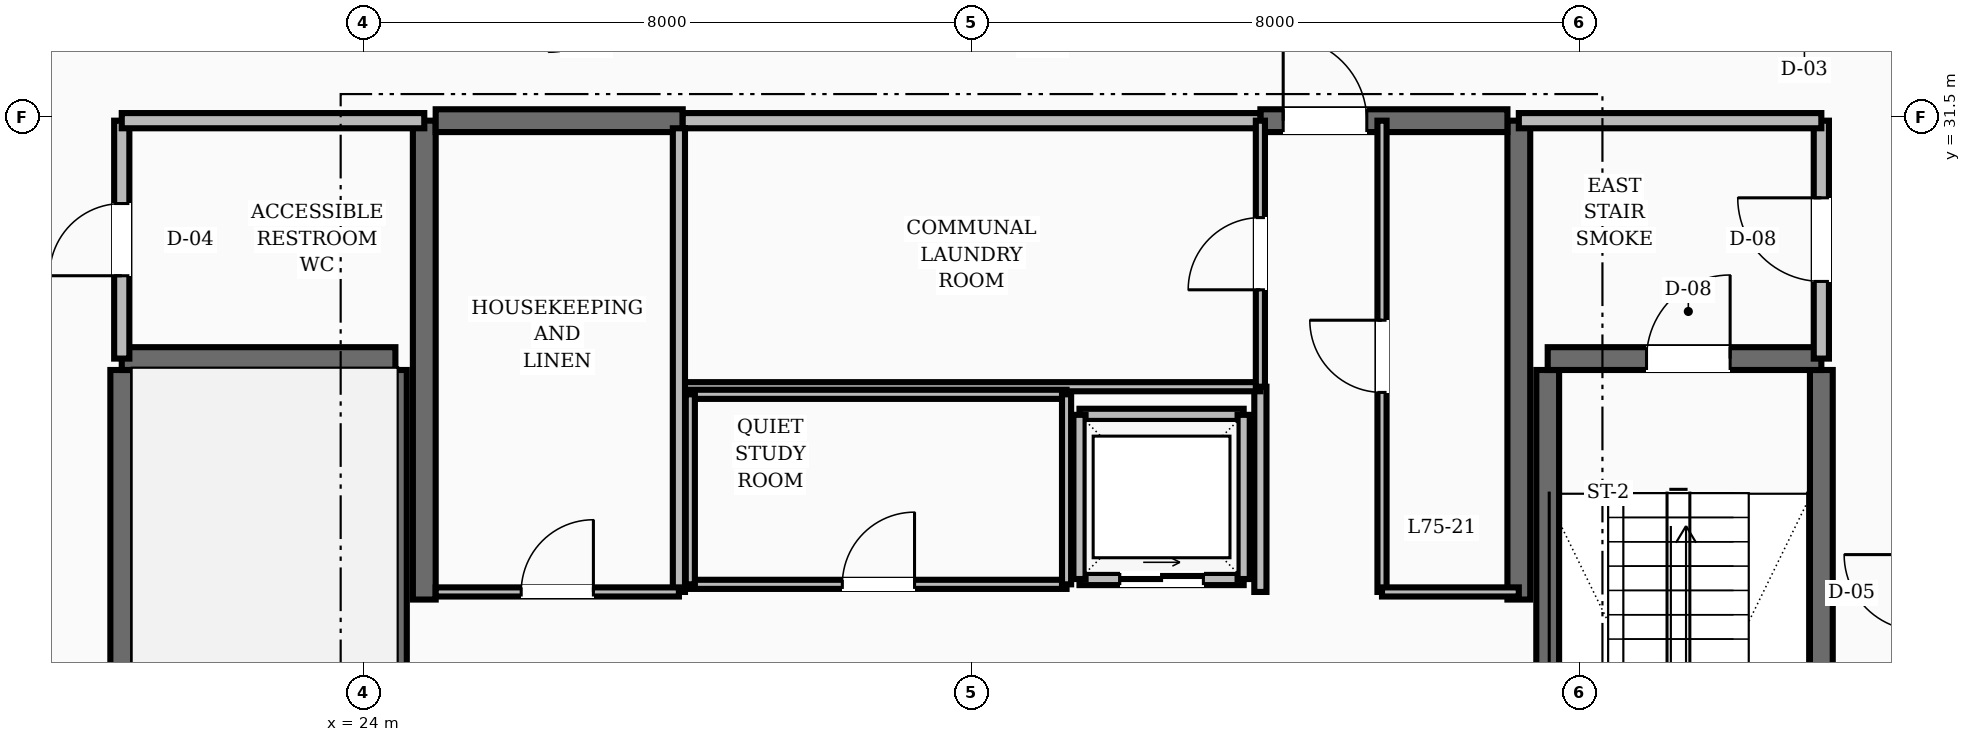
"""IFC4 building model, lengths in metres.
Left out: names, types, materials, properties, quantities, classifications, styles, units other than length and angle.
Written with IfcOpenShell. Run it as: python <this file> out.ifc"""

import sys

from ifc_helpers import new_model, si_unit, direction, frame, frame_2d, origin, place, context, subcontext, project, spatial, rectangle, extrude, element, fill, save


model = new_model("IFC4")
c1 = context("Model", 3, precision=1e-05, world=origin(), true_north=direction((0.0, 1.0)))
c2 = subcontext(c1, "Body", "Model", "MODEL_VIEW")
j1 = project(units=[si_unit("LENGTHUNIT", "METRE"), si_unit("PLANEANGLEUNIT", "RADIAN")], contexts=[c1])
p1 = place(None, origin())
s1 = spatial("IfcSite", under=j1, at=p1, CompositionType="ELEMENT")
p2 = place(p1, origin())
s2 = spatial("IfcBuilding", under=s1, at=p2, CompositionType="ELEMENT")
p3 = place(p2, frame((0.0, 0.0, 286.8)))
s3 = spatial("IfcBuildingStorey", under=s2, at=p3, CompositionType="ELEMENT", Elevation=286.8)
for number, where, z_axis, x_axis in (
    (1, (24.8, 25.15, 0.0), (0.0, 0.0, 1.0), (0.0, 1.0, 0.0)),
    (2, (39.2, 25.15, 0.0), (0.0, 0.0, 1.0), (0.0, 1.0, 0.0)),
):
    element("IfcWall", number, at=place(p3, frame(where, z_axis=z_axis, x_axis=x_axis)), inside=s3, PredefinedType="SHEAR", context=c2, shape_type="SweptSolid", body=[
        extrude(rectangle(XDim=6.3, YDim=0.3, at=frame_2d((3.15, 0.0))), origin(), (0.0, 0.0, 1.0), 3.6),
    ])
p4 = place(p3, frame((24.95, 31.45, 0.0), z_axis=(0.0, 0.0, 1.0), x_axis=(1.0, 0.0, 0.0)))
e3 = element("IfcWall", 3, at=p4, inside=s3, PredefinedType="SHEAR", context=c2, shape_type="SweptSolid", body=[
    extrude(rectangle(XDim=3.25, YDim=0.3, at=frame_2d((1.625, 0.0))), origin(), (0.0, 0.0, 1.0), 3.6),
])
p5 = place(p3, frame((35.8, 31.45, 0.0), z_axis=(0.0, 0.0, 1.0), x_axis=(1.0, 0.0, 0.0)))
e4 = element("IfcWall", 4, at=p5, inside=s3, PredefinedType="SHEAR", context=c2, shape_type="SweptSolid", body=[
    extrude(rectangle(XDim=3.25, YDim=0.3, at=frame_2d((1.625, 0.0))), origin(), (0.0, 0.0, 1.0), 3.6),
])
p6 = place(p5, frame((0.3, 0.0, 0.0)))
e5 = element("IfcOpeningElement", 5, at=p6, cuts=e4, PredefinedType="OPENING", context=c2, shape_type="SweptSolid", body=[
    extrude(rectangle(XDim=1.1, YDim=2.1, at=frame_2d((0.55, 1.05))), frame((0.0, 0.16, 0.0), z_axis=(0.0, -1.0, 0.0), x_axis=(1.0, 0.0, 0.0)), (0.0, 0.0, 1.0), 0.32),
])
for number, where, z_axis, x_axis in (
    (6, (20.82, 19.43, 0.0), (0.0, 0.0, 1.0), (0.0, 1.0, 0.0)),
    (7, (24.42, 19.43, 0.0), (0.0, 0.0, 1.0), (0.0, 1.0, 0.0)),
):
    element("IfcWall", number, at=place(p3, frame(where, z_axis=z_axis, x_axis=x_axis)), inside=s3, PredefinedType="SHEAR", context=c2, shape_type="SweptSolid", body=[
        extrude(rectangle(XDim=8.74, YDim=0.3, at=frame_2d((4.37, 0.0))), origin(), (0.0, 0.0, 1.0), 3.6),
    ])
p7 = place(p3, frame((20.82, 28.32, 0.0), z_axis=(0.0, 0.0, 1.0), x_axis=(1.0, 0.0, 0.0)))
e8 = element("IfcWall", 8, at=p7, inside=s3, PredefinedType="SHEAR", context=c2, shape_type="SweptSolid", body=[
    extrude(rectangle(XDim=3.6, YDim=0.3, at=frame_2d((1.8, 0.0))), origin(), (0.0, 0.0, 1.0), 3.6),
])
for number, where, z_axis, x_axis in (
    (9, (43.18, 19.43, 0.0), (0.0, 0.0, 1.0), (0.0, 1.0, 0.0)),
    (10, (39.58, 19.43, 0.0), (0.0, 0.0, 1.0), (0.0, 1.0, 0.0)),
):
    element("IfcWall", number, at=place(p3, frame(where, z_axis=z_axis, x_axis=x_axis)), inside=s3, PredefinedType="SHEAR", context=c2, shape_type="SweptSolid", body=[
        extrude(rectangle(XDim=8.74, YDim=0.3, at=frame_2d((4.37, 0.0))), origin(), (0.0, 0.0, 1.0), 3.6),
    ])
p8 = place(p3, frame((39.58, 28.32, 0.0), z_axis=(0.0, 0.0, 1.0), x_axis=(1.0, 0.0, 0.0)))
e11 = element("IfcWall", 11, at=p8, inside=s3, PredefinedType="SHEAR", context=c2, shape_type="SweptSolid", body=[
    extrude(rectangle(XDim=3.6, YDim=0.3, at=frame_2d((1.8, 0.0))), origin(), (0.0, 0.0, 1.0), 3.6),
])
p9 = place(p8, frame((1.3, 0.0, 0.0)))
e12 = element("IfcOpeningElement", 12, at=p9, cuts=e11, PredefinedType="OPENING", context=c2, shape_type="SweptSolid", body=[
    extrude(rectangle(XDim=1.1, YDim=2.1, at=frame_2d((0.55, 1.05))), frame((0.0, 0.16, 0.0), z_axis=(0.0, -1.0, 0.0), x_axis=(1.0, 0.0, 0.0)), (0.0, 0.0, 1.0), 0.32),
])
p10 = place(p3, frame((43.18, 28.32, 0.0), z_axis=(0.0, 0.0, 1.0), x_axis=(0.0, 1.0, 0.0)))
e13 = element("IfcWall", 13, at=p10, inside=s3, PredefinedType="SOLIDWALL", context=c2, shape_type="SweptSolid", body=[
    extrude(rectangle(XDim=3.13, YDim=0.2, at=frame_2d((1.565, 0.0))), origin(), (0.0, 0.0, 1.0), 2.87),
])
p11 = place(p10, frame((1.015, 0.0, 0.0)))
e14 = element("IfcOpeningElement", 14, at=p11, cuts=e13, PredefinedType="OPENING", context=c2, shape_type="SweptSolid", body=[
    extrude(rectangle(XDim=1.1, YDim=2.1, at=frame_2d((0.55, 1.05))), frame((0.0, 0.11, 0.0), z_axis=(0.0, -1.0, 0.0), x_axis=(1.0, 0.0, 0.0)), (0.0, 0.0, 1.0), 0.22),
])
p12 = place(p3, frame((39.2, 31.45, 0.0), z_axis=(0.0, 0.0, 1.0), x_axis=(1.0, 0.0, 0.0)))
e15 = element("IfcWall", 15, at=p12, inside=s3, PredefinedType="SOLIDWALL", context=c2, shape_type="SweptSolid", body=[
    extrude(rectangle(XDim=3.98, YDim=0.2, at=frame_2d((1.99, 0.0))), origin(), (0.0, 0.0, 1.0), 2.87),
])
p13 = place(p3, frame((20.82, 28.32, 0.0), z_axis=(0.0, 0.0, 1.0), x_axis=(0.0, 1.0, 0.0)))
e16 = element("IfcWall", 16, at=p13, inside=s3, PredefinedType="SOLIDWALL", context=c2, shape_type="SweptSolid", body=[
    extrude(rectangle(XDim=3.13, YDim=0.2, at=frame_2d((1.565, 0.0))), origin(), (0.0, 0.0, 1.0), 2.87),
])
p14 = place(p13, frame((1.09, 0.0, 0.0)))
e17 = element("IfcOpeningElement", 17, at=p14, cuts=e16, PredefinedType="OPENING", context=c2, shape_type="SweptSolid", body=[
    extrude(rectangle(XDim=0.95, YDim=2.1, at=frame_2d((0.475, 1.05))), frame((0.0, 0.11, 0.0), z_axis=(0.0, -1.0, 0.0), x_axis=(1.0, 0.0, 0.0)), (0.0, 0.0, 1.0), 0.22),
])
p15 = place(p3, frame((20.82, 31.45, 0.0), z_axis=(0.0, 0.0, 1.0), x_axis=(1.0, 0.0, 0.0)))
e18 = element("IfcWall", 18, at=p15, inside=s3, PredefinedType="SOLIDWALL", context=c2, shape_type="SweptSolid", body=[
    extrude(rectangle(XDim=3.98, YDim=0.2, at=frame_2d((1.99, 0.0))), origin(), (0.0, 0.0, 1.0), 2.87),
])
p16 = place(p3, frame((35.8, 25.25, 0.0), z_axis=(0.0, 0.0, 1.0), x_axis=(0.0, 1.0, 0.0)))
e19 = element("IfcWall", 19, at=p16, inside=s3, PredefinedType="SOLIDWALL", context=c2, shape_type="SweptSolid", body=[
    extrude(rectangle(XDim=2.7, YDim=0.16, at=frame_2d((1.35, 0.0))), origin(), (0.0, 0.0, 1.0), 2.87),
])
p17 = place(p3, frame((33.42, 25.42, 0.0), z_axis=(0.0, 0.0, 1.0), x_axis=(1.0, 0.0, 0.0)))
e20 = element("IfcWall", 20, at=p17, inside=s3, PredefinedType="SOLIDWALL", context=c2, shape_type="SweptSolid", body=[
    extrude(rectangle(XDim=2.16, YDim=0.16, at=frame_2d((1.08, 0.0))), origin(), (0.0, 0.0, 1.0), 2.87),
])
p18 = place(p17, frame((0.53, 0.0, 0.0)))
e21 = element("IfcOpeningElement", 21, at=p18, cuts=e20, PredefinedType="OPENING", context=c2, shape_type="SweptSolid", body=[
    extrude(rectangle(XDim=1.1, YDim=2.15, at=frame_2d((0.55, 1.075))), frame((0.0, 0.09, 0.0), z_axis=(0.0, -1.0, 0.0), x_axis=(1.0, 0.0, 0.0)), (0.0, 0.0, 1.0), 0.18),
])
for number, where, z_axis, x_axis in (
    (22, (33.42, 27.58, 0.0), (0.0, 0.0, 1.0), (1.0, 0.0, 0.0)),
    (23, (33.42, 25.42, 0.0), (0.0, 0.0, 1.0), (0.0, 1.0, 0.0)),
    (24, (35.58, 25.42, 0.0), (0.0, 0.0, 1.0), (0.0, 1.0, 0.0)),
):
    element("IfcWall", number, at=place(p3, frame(where, z_axis=z_axis, x_axis=x_axis)), inside=s3, PredefinedType="SOLIDWALL", context=c2, shape_type="SweptSolid", body=[
        extrude(rectangle(XDim=2.16, YDim=0.16, at=frame_2d((1.08, 0.0))), origin(), (0.0, 0.0, 1.0), 2.87),
    ])
p19 = place(p3, frame((28.2, 31.45, 0.0), z_axis=(0.0, 0.0, 1.0), x_axis=(1.0, 0.0, 0.0)))
e25 = element("IfcWall", 25, at=p19, inside=s3, PredefinedType="SOLIDWALL", context=c2, shape_type="SweptSolid", body=[
    extrude(rectangle(XDim=7.6, YDim=0.2, at=frame_2d((3.8, 0.0))), origin(), (0.0, 0.0, 1.0), 2.87),
])
p20 = place(p3, frame((28.2, 27.95, 0.0), z_axis=(0.0, 0.0, 1.0), x_axis=(1.0, 0.0, 0.0)))
e26 = element("IfcWall", 26, at=p20, inside=s3, PredefinedType="PARTITIONING", context=c2, shape_type="SweptSolid", body=[
    extrude(rectangle(XDim=7.6, YDim=0.12, at=frame_2d((3.8, 0.0))), origin(), (0.0, 0.0, 1.0), 2.87),
])
p21 = place(p3, frame((35.8, 27.95, 0.0), z_axis=(0.0, 0.0, 1.0), x_axis=(0.0, 1.0, 0.0)))
e27 = element("IfcWall", 27, at=p21, inside=s3, PredefinedType="PARTITIONING", context=c2, shape_type="SweptSolid", body=[
    extrude(rectangle(XDim=3.5, YDim=0.12, at=frame_2d((1.75, 0.0))), origin(), (0.0, 0.0, 1.0), 2.87),
])
p22 = place(p21, frame((1.275, 0.0, 0.0)))
e28 = element("IfcOpeningElement", 28, at=p22, cuts=e27, PredefinedType="OPENING", context=c2, shape_type="SweptSolid", body=[
    extrude(rectangle(XDim=0.95, YDim=2.1, at=frame_2d((0.475, 1.05))), frame((0.0, 0.07, 0.0), z_axis=(0.0, -1.0, 0.0), x_axis=(1.0, 0.0, 0.0)), (0.0, 0.0, 1.0), 0.14),
])
p23 = place(p3, frame((28.3, 25.35, 0.0), z_axis=(0.0, 0.0, 1.0), x_axis=(1.0, 0.0, 0.0)))
e29 = element("IfcWall", 29, at=p23, inside=s3, PredefinedType="PARTITIONING", context=c2, shape_type="SweptSolid", body=[
    extrude(rectangle(XDim=4.95, YDim=0.12, at=frame_2d((2.475, 0.0))), origin(), (0.0, 0.0, 1.0), 2.87),
])
p24 = place(p23, frame((2.0, 0.0, 0.0)))
e30 = element("IfcOpeningElement", 30, at=p24, cuts=e29, PredefinedType="OPENING", context=c2, shape_type="SweptSolid", body=[
    extrude(rectangle(XDim=0.95, YDim=2.1, at=frame_2d((0.475, 1.05))), frame((0.0, 0.07, 0.0), z_axis=(0.0, -1.0, 0.0), x_axis=(1.0, 0.0, 0.0)), (0.0, 0.0, 1.0), 0.14),
])
p25 = place(p3, frame((28.3, 27.85, 0.0), z_axis=(0.0, 0.0, 1.0), x_axis=(1.0, 0.0, 0.0)))
e31 = element("IfcWall", 31, at=p25, inside=s3, PredefinedType="PARTITIONING", context=c2, shape_type="SweptSolid", body=[
    extrude(rectangle(XDim=4.95, YDim=0.12, at=frame_2d((2.475, 0.0))), origin(), (0.0, 0.0, 1.0), 2.87),
])
for number, where, z_axis, x_axis in (
    (32, (28.3, 25.35, 0.0), (0.0, 0.0, 1.0), (0.0, 1.0, 0.0)),
    (33, (33.25, 25.35, 0.0), (0.0, 0.0, 1.0), (0.0, 1.0, 0.0)),
):
    element("IfcWall", number, at=place(p3, frame(where, z_axis=z_axis, x_axis=x_axis)), inside=s3, PredefinedType="PARTITIONING", context=c2, shape_type="SweptSolid", body=[
        extrude(rectangle(XDim=2.5, YDim=0.12, at=frame_2d((1.25, 0.0))), origin(), (0.0, 0.0, 1.0), 2.87),
    ])
p26 = place(p3, frame((28.15, 25.25, 0.0), z_axis=(0.0, 0.0, 1.0), x_axis=(0.0, 1.0, 0.0)))
e34 = element("IfcWall", 34, at=p26, inside=s3, PredefinedType="SOLIDWALL", context=c2, shape_type="SweptSolid", body=[
    extrude(rectangle(XDim=6.1, YDim=0.16, at=frame_2d((3.05, 0.0))), origin(), (0.0, 0.0, 1.0), 2.87),
])
p27 = place(p3, frame((24.95, 25.25, 0.0), z_axis=(0.0, 0.0, 1.0), x_axis=(1.0, 0.0, 0.0)))
e35 = element("IfcWall", 35, at=p27, inside=s3, PredefinedType="PARTITIONING", context=c2, shape_type="SweptSolid", body=[
    extrude(rectangle(XDim=3.2, YDim=0.12, at=frame_2d((1.6, 0.0))), origin(), (0.0, 0.0, 1.0), 2.87),
])
p28 = place(p27, frame((1.125, 0.0, 0.0)))
e36 = element("IfcOpeningElement", 36, at=p28, cuts=e35, PredefinedType="OPENING", context=c2, shape_type="SweptSolid", body=[
    extrude(rectangle(XDim=0.95, YDim=2.1, at=frame_2d((0.475, 1.05))), frame((0.0, 0.07, 0.0), z_axis=(0.0, -1.0, 0.0), x_axis=(1.0, 0.0, 0.0)), (0.0, 0.0, 1.0), 0.14),
])
p29 = place(p3, frame((37.4, 25.25, 0.0), z_axis=(0.0, 0.0, 1.0), x_axis=(0.0, 1.0, 0.0)))
e37 = element("IfcWall", 37, at=p29, inside=s3, PredefinedType="PARTITIONING", context=c2, shape_type="SweptSolid", body=[
    extrude(rectangle(XDim=6.2, YDim=0.12, at=frame_2d((3.1, 0.0))), origin(), (0.0, 0.0, 1.0), 2.87),
])
p30 = place(p29, frame((2.625, 0.0, 0.0)))
e38 = element("IfcOpeningElement", 38, at=p30, cuts=e37, PredefinedType="OPENING", context=c2, shape_type="SweptSolid", body=[
    extrude(rectangle(XDim=0.95, YDim=2.1, at=frame_2d((0.475, 1.05))), frame((0.0, 0.07, 0.0), z_axis=(0.0, -1.0, 0.0), x_axis=(1.0, 0.0, 0.0)), (0.0, 0.0, 1.0), 0.14),
])
p31 = place(p3, frame((37.4, 25.25, 0.0), z_axis=(0.0, 0.0, 1.0), x_axis=(1.0, 0.0, 0.0)))
e39 = element("IfcWall", 39, at=p31, inside=s3, PredefinedType="PARTITIONING", context=c2, shape_type="SweptSolid", body=[
    extrude(rectangle(XDim=1.8, YDim=0.12, at=frame_2d((0.9, 0.0))), origin(), (0.0, 0.0, 1.0), 2.87),
])
p32 = place(p3, frame((44.427, 32.303, 0.0), z_axis=(0.0, 0.0, 1.0), x_axis=(-0.707106781187, 0.707106781187, 0.0)))
e40 = element("IfcWall", 40, at=p32, inside=s3, PredefinedType="SOLIDWALL", context=c2, shape_type="SweptSolid", body=[
    extrude(rectangle(XDim=2.916, YDim=0.16, at=frame_2d((1.458, 0.0))), origin(), (0.0, 0.0, 1.0), 2.87),
])
p33 = place(p32, frame((0.983, 0.0, 0.0)))
e41 = element("IfcOpeningElement", 41, at=p33, cuts=e40, PredefinedType="OPENING", context=c2, shape_type="SweptSolid", body=[
    extrude(rectangle(XDim=0.95, YDim=2.1, at=frame_2d((0.475, 1.05))), frame((0.0, 0.09, 0.0), z_axis=(0.0, -1.0, 0.0), x_axis=(1.0, 0.0, 0.0)), (0.0, 0.0, 1.0), 0.18),
])
p34 = place(p3, frame((21.635, 34.365, 0.0), z_axis=(0.0, 0.0, 1.0), x_axis=(-0.707106781187, -0.707106781187, 0.0)))
e42 = element("IfcWall", 42, at=p34, inside=s3, PredefinedType="SOLIDWALL", context=c2, shape_type="SweptSolid", body=[
    extrude(rectangle(XDim=2.916, YDim=0.16, at=frame_2d((1.458, 0.0))), origin(), (0.0, 0.0, 1.0), 2.87),
])
p35 = place(p9, origin())
e43 = element("IfcDoor", 43, at=p35, inside=s3, OperationType="SINGLE_SWING_RIGHT", PredefinedType="DOOR", context=c2, shape_type="SweptSolid", body=[
    extrude(rectangle(XDim=1.1, YDim=2.1, at=frame_2d((0.55, 1.05))), frame((0.0, 0.025, 0.0), z_axis=(0.0, -1.0, 0.0), x_axis=(1.0, 0.0, 0.0)), (0.0, 0.0, 1.0), 0.05),
])
fill(e12, e43)
p36 = place(p11, origin())
e44 = element("IfcDoor", 44, at=p36, inside=s3, OperationType="SINGLE_SWING_RIGHT", PredefinedType="DOOR", context=c2, shape_type="SweptSolid", body=[
    extrude(rectangle(XDim=1.1, YDim=2.1, at=frame_2d((0.55, 1.05))), frame((0.0, 0.025, 0.0), z_axis=(0.0, -1.0, 0.0), x_axis=(1.0, 0.0, 0.0)), (0.0, 0.0, 1.0), 0.05),
])
fill(e14, e44)
p37 = place(p14, origin())
e45 = element("IfcDoor", 45, at=p37, inside=s3, OperationType="SINGLE_SWING_LEFT", PredefinedType="DOOR", context=c2, shape_type="SweptSolid", body=[
    extrude(rectangle(XDim=0.95, YDim=2.1, at=frame_2d((0.475, 1.05))), frame((0.0, 0.025, 0.0), z_axis=(0.0, -1.0, 0.0), x_axis=(1.0, 0.0, 0.0)), (0.0, 0.0, 1.0), 0.05),
])
fill(e17, e45)
p38 = place(p6, origin())
e46 = element("IfcDoor", 46, at=p38, inside=s3, OperationType="SINGLE_SWING_LEFT", PredefinedType="DOOR", context=c2, shape_type="SweptSolid", body=[
    extrude(rectangle(XDim=1.1, YDim=2.1, at=frame_2d((0.55, 1.05))), frame((0.0, 0.025, 0.0), z_axis=(0.0, -1.0, 0.0), x_axis=(1.0, 0.0, 0.0)), (0.0, 0.0, 1.0), 0.05),
])
fill(e5, e46)
p39 = place(p18, origin())
e47 = element("IfcDoor", 47, at=p39, inside=s3, OperationType="SLIDING_TO_RIGHT", PredefinedType="DOOR", context=c2, shape_type="SweptSolid", body=[
    extrude(rectangle(XDim=1.1, YDim=2.15, at=frame_2d((0.55, 1.075))), frame((0.0, 0.025, 0.0), z_axis=(0.0, -1.0, 0.0), x_axis=(1.0, 0.0, 0.0)), (0.0, 0.0, 1.0), 0.05),
])
fill(e21, e47)
p40 = place(p22, origin())
e48 = element("IfcDoor", 48, at=p40, inside=s3, OperationType="SINGLE_SWING_LEFT", PredefinedType="DOOR", context=c2, shape_type="SweptSolid", body=[
    extrude(rectangle(XDim=0.95, YDim=2.1, at=frame_2d((0.475, 1.05))), frame((0.0, 0.025, 0.0), z_axis=(0.0, -1.0, 0.0), x_axis=(1.0, 0.0, 0.0)), (0.0, 0.0, 1.0), 0.05),
])
fill(e28, e48)
p41 = place(p24, origin())
e49 = element("IfcDoor", 49, at=p41, inside=s3, OperationType="SINGLE_SWING_RIGHT", PredefinedType="DOOR", context=c2, shape_type="SweptSolid", body=[
    extrude(rectangle(XDim=0.95, YDim=2.1, at=frame_2d((0.475, 1.05))), frame((0.0, 0.025, 0.0), z_axis=(0.0, -1.0, 0.0), x_axis=(1.0, 0.0, 0.0)), (0.0, 0.0, 1.0), 0.05),
])
fill(e30, e49)
p42 = place(p28, origin())
e50 = element("IfcDoor", 50, at=p42, inside=s3, OperationType="SINGLE_SWING_RIGHT", PredefinedType="DOOR", context=c2, shape_type="SweptSolid", body=[
    extrude(rectangle(XDim=0.95, YDim=2.1, at=frame_2d((0.475, 1.05))), frame((0.0, 0.025, 0.0), z_axis=(0.0, -1.0, 0.0), x_axis=(1.0, 0.0, 0.0)), (0.0, 0.0, 1.0), 0.05),
])
fill(e36, e50)
p43 = place(p30, origin())
e51 = element("IfcDoor", 51, at=p43, inside=s3, OperationType="SINGLE_SWING_RIGHT", PredefinedType="DOOR", context=c2, shape_type="SweptSolid", body=[
    extrude(rectangle(XDim=0.95, YDim=2.1, at=frame_2d((0.475, 1.05))), frame((0.0, 0.025, 0.0), z_axis=(0.0, -1.0, 0.0), x_axis=(1.0, 0.0, 0.0)), (0.0, 0.0, 1.0), 0.05),
])
fill(e38, e51)
save(model, sys.argv[1])
